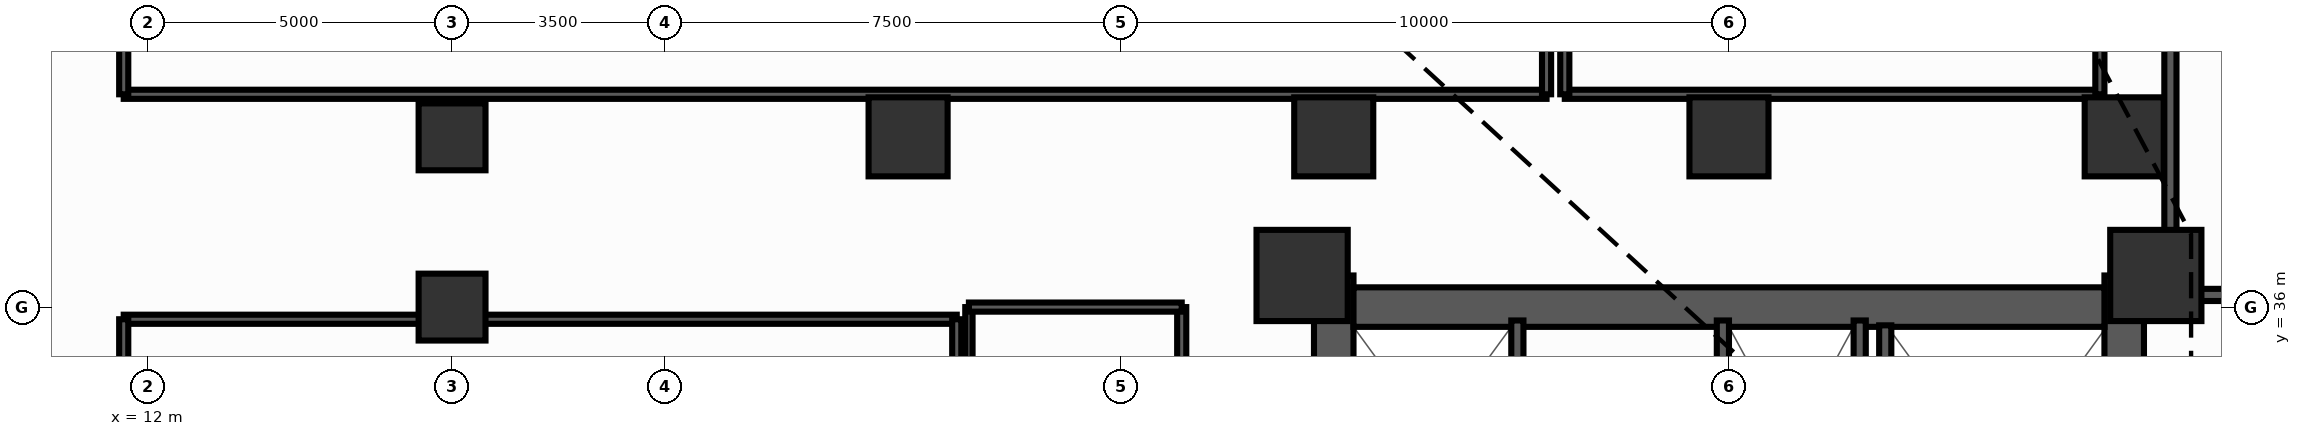
"""IFC4 building model, lengths in metres.
Left out: names, types, materials, properties, quantities, classifications, styles, units other than length and angle.
Written with IfcOpenShell. Run it as: python <this file> out.ifc"""

import sys

from ifc_helpers import new_model, si_unit, direction, frame, frame_2d, origin, origin_2d, place, context, subcontext, project, spatial, rectangle, extrude, source, transform, mapped, element, fill, save


model = new_model("IFC4")
c1 = context("Model", 3, precision=1e-05, world=origin(), true_north=direction((0.0, 1.0)))
c2 = subcontext(c1, "Body", "Model", "MODEL_VIEW")
j1 = project(units=[si_unit("LENGTHUNIT", "METRE"), si_unit("PLANEANGLEUNIT", "RADIAN")], contexts=[c1])
p1 = place(None, origin())
s1 = spatial("IfcSite", under=j1, at=p1, CompositionType="ELEMENT")
p2 = place(p1, origin())
s2 = spatial("IfcBuilding", under=s1, at=p2, CompositionType="ELEMENT")
p3 = place(p2, origin())
s3 = spatial("IfcBuildingStorey", under=s2, at=p3, CompositionType="ELEMENT", Elevation=0.0)
p4 = place(p3, frame((31.5, 17.48, 0.0), z_axis=(0.0, 0.0, 1.0), x_axis=(0.0, 1.0, 0.0)))
e1 = element("IfcWall", 1, at=p4, inside=s3, PredefinedType="SHEAR", context=c2, shape_type="SweptSolid", body=[
    extrude(rectangle(XDim=19.04, YDim=0.65, at=frame_2d((9.52, 0.0))), origin(), (0.0, 0.0, 1.0), 4.2),
])
p5 = place(p4, frame((6.32, 0.0, 0.0)))
e2 = element("IfcOpeningElement", 2, at=p5, cuts=e1, PredefinedType="OPENING", context=c2, shape_type="SweptSolid", body=[
    extrude(rectangle(XDim=1.1, YDim=2.15, at=frame_2d((0.55, 1.075))), frame((0.0, 0.337, 0.0), z_axis=(0.0, -1.0, 0.0), x_axis=(1.0, 0.0, 0.0)), (0.0, 0.0, 1.0), 0.674),
])
p6 = place(p3, frame((44.5, 17.48, 0.0), z_axis=(0.0, 0.0, 1.0), x_axis=(0.0, 1.0, 0.0)))
e3 = element("IfcWall", 3, at=p6, inside=s3, PredefinedType="SHEAR", context=c2, shape_type="SweptSolid", body=[
    extrude(rectangle(XDim=19.04, YDim=0.65, at=frame_2d((9.52, 0.0))), origin(), (0.0, 0.0, 1.0), 4.2),
])
p7 = place(p6, frame((12.67, 0.0, 0.0), z_axis=(0.0, 0.0, 1.0), x_axis=(-1.0, 0.0, 0.0)))
e4 = element("IfcOpeningElement", 4, at=p7, cuts=e3, PredefinedType="OPENING", context=c2, shape_type="SweptSolid", body=[
    extrude(rectangle(XDim=1.1, YDim=2.15, at=frame_2d((0.55, 1.075))), frame((0.0, 0.337, 0.0), z_axis=(0.0, -1.0, 0.0), x_axis=(1.0, 0.0, 0.0)), (0.0, 0.0, 1.0), 0.674),
])
p8 = place(p3, frame((31.825, 36.0, 0.0), z_axis=(0.0, 0.0, 1.0), x_axis=(1.0, 0.0, 0.0)))
e5 = element("IfcWall", 5, at=p8, inside=s3, PredefinedType="SHEAR", context=c2, shape_type="SweptSolid", body=[
    extrude(rectangle(XDim=12.35, YDim=0.65, at=frame_2d((6.175, 0.0))), origin(), (0.0, 0.0, 1.0), 4.2),
])
p9 = place(p8, frame((5.125, 0.0, 0.0), z_axis=(0.0, 0.0, 1.0), x_axis=(-1.0, 0.0, 0.0)))
e6 = element("IfcOpeningElement", 6, at=p9, cuts=e5, PredefinedType="OPENING", context=c2, shape_type="SweptSolid", body=[
    extrude(rectangle(XDim=1.4, YDim=2.15, at=frame_2d((0.7, 1.075))), frame((0.0, 0.337, 0.0), z_axis=(0.0, -1.0, 0.0), x_axis=(1.0, 0.0, 0.0)), (0.0, 0.0, 1.0), 0.674),
])
m1 = source(origin(), c2, "Body", "SweptSolid", [
    extrude(rectangle(XDim=1.5, YDim=1.5, at=origin_2d()), origin(), (0.0, 0.0, 1.0), 4.2),
])
for number, where, z_axis, x_axis in (
    (7, (30.98, 36.52, 0.0), (0.0, 0.0, 1.0), (1.0, 0.0, 0.0)),
    (8, (45.02, 36.52, 0.0), (0.0, 0.0, 1.0), (1.0, 0.0, 0.0)),
):
    element("IfcColumn", number, at=place(p3, frame(where, z_axis=z_axis, x_axis=x_axis)), inside=s3, PredefinedType="COLUMN", context=c2, shape_type="MappedRepresentation", body=[
        mapped(m1, transform((0.0, 0.0, 0.0), scale=1.0)),
    ])
m2 = source(origin(), c2, "Body", "SweptSolid", [
    extrude(rectangle(XDim=1.1, YDim=1.1, at=origin_2d()), origin(), (0.0, 0.0, 1.0), 4.2),
])
for number, where, z_axis, x_axis in (
    (9, (17.0, 36.0, 0.0), (0.0, 0.0, 1.0), (1.0, 0.0, 0.0)),
    (10, (17.0, 38.8, 0.0), (0.0, 0.0, 1.0), (1.0, 0.0, 0.0)),
):
    element("IfcColumn", number, at=place(p3, frame(where, z_axis=z_axis, x_axis=x_axis)), inside=s3, PredefinedType="COLUMN", context=c2, shape_type="MappedRepresentation", body=[
        mapped(m2, transform((0.0, 0.0, 0.0), scale=1.0)),
    ])
m3 = source(origin(), c2, "Body", "SweptSolid", [
    extrude(rectangle(XDim=1.3, YDim=1.3, at=origin_2d()), origin(), (0.0, 0.0, 1.0), 4.2),
])
for number, where, z_axis, x_axis in (
    (11, (24.5, 38.8, 0.0), (0.0, 0.0, 1.0), (1.0, 0.0, 0.0)),
    (12, (31.5, 38.8, 0.0), (0.0, 0.0, 1.0), (1.0, 0.0, 0.0)),
    (13, (38.0, 38.8, 0.0), (0.0, 0.0, 1.0), (1.0, 0.0, 0.0)),
    (14, (44.5, 38.8, 0.0), (0.0, 0.0, 1.0), (1.0, 0.0, 0.0)),
):
    element("IfcColumn", number, at=place(p3, frame(where, z_axis=z_axis, x_axis=x_axis)), inside=s3, PredefinedType="COLUMN", context=c2, shape_type="MappedRepresentation", body=[
        mapped(m3, transform((0.0, 0.0, 0.0), scale=1.0)),
    ])
p10 = place(p3, frame((40.15, 31.8, 0.0), z_axis=(0.0, 0.0, 1.0), x_axis=(0.0, 1.0, 0.0)))
e15 = element("IfcWall", 15, at=p10, inside=s3, PredefinedType="PARTITIONING", context=c2, shape_type="SweptSolid", body=[
    extrude(rectangle(XDim=3.98, YDim=0.2, at=frame_2d((1.99, 0.0))), origin(), (0.0, 0.0, 1.0), 3.92),
])
p11 = place(p3, frame((40.57, 28.65, 0.0), z_axis=(0.0, 0.0, 1.0), x_axis=(0.0, 1.0, 0.0)))
e16 = element("IfcWall", 16, at=p11, inside=s3, PredefinedType="SOLIDWALL", context=c2, shape_type="SweptSolid", body=[
    extrude(rectangle(XDim=7.05, YDim=0.2, at=frame_2d((3.525, 0.0))), origin(), (0.0, 0.0, 1.0), 3.92),
])
p12 = place(p3, frame((34.52, 25.44, 0.0), z_axis=(0.0, 0.0, 1.0), x_axis=(0.0, 1.0, 0.0)))
e17 = element("IfcWall", 17, at=p12, inside=s3, PredefinedType="PARTITIONING", context=c2, shape_type="SweptSolid", body=[
    extrude(rectangle(XDim=10.34, YDim=0.2, at=frame_2d((5.17, 0.0))), origin(), (0.0, 0.0, 1.0), 3.92),
])
p13 = place(p12, frame((0.32, 0.0, 0.0)))
e18 = element("IfcOpeningElement", 18, at=p13, cuts=e17, PredefinedType="OPENING", context=c2, shape_type="SweptSolid", body=[
    extrude(rectangle(XDim=1.0, YDim=2.15, at=frame_2d((0.5, 1.075))), frame((0.0, 0.112, 0.0), z_axis=(0.0, -1.0, 0.0), x_axis=(1.0, 0.0, 0.0)), (0.0, 0.0, 1.0), 0.224),
])
p14 = place(p12, frame((1.71, 0.0, 0.0)))
e19 = element("IfcOpeningElement", 19, at=p14, cuts=e17, PredefinedType="OPENING", context=c2, shape_type="SweptSolid", body=[
    extrude(rectangle(XDim=1.0, YDim=2.15, at=frame_2d((0.5, 1.075))), frame((0.0, 0.112, 0.0), z_axis=(0.0, -1.0, 0.0), x_axis=(1.0, 0.0, 0.0)), (0.0, 0.0, 1.0), 0.224),
])
p15 = place(p12, frame((3.535, 0.0, 0.0)))
e20 = element("IfcOpeningElement", 20, at=p15, cuts=e17, PredefinedType="OPENING", context=c2, shape_type="SweptSolid", body=[
    extrude(rectangle(XDim=1.0, YDim=2.15, at=frame_2d((0.5, 1.075))), frame((0.0, 0.112, 0.0), z_axis=(0.0, -1.0, 0.0), x_axis=(1.0, 0.0, 0.0)), (0.0, 0.0, 1.0), 0.224),
])
p16 = place(p12, frame((5.135, 0.0, 0.0)))
e21 = element("IfcOpeningElement", 21, at=p16, cuts=e17, PredefinedType="OPENING", context=c2, shape_type="SweptSolid", body=[
    extrude(rectangle(XDim=1.0, YDim=2.15, at=frame_2d((0.5, 1.075))), frame((0.0, 0.112, 0.0), z_axis=(0.0, -1.0, 0.0), x_axis=(1.0, 0.0, 0.0)), (0.0, 0.0, 1.0), 0.224),
])
p17 = place(p12, frame((7.01, 0.0, 0.0)))
e22 = element("IfcOpeningElement", 22, at=p17, cuts=e17, PredefinedType="OPENING", context=c2, shape_type="SweptSolid", body=[
    extrude(rectangle(XDim=1.0, YDim=2.15, at=frame_2d((0.5, 1.075))), frame((0.0, 0.112, 0.0), z_axis=(0.0, -1.0, 0.0), x_axis=(1.0, 0.0, 0.0)), (0.0, 0.0, 1.0), 0.224),
])
p18 = place(p12, frame((8.76, 0.0, 0.0)))
e23 = element("IfcOpeningElement", 23, at=p18, cuts=e17, PredefinedType="OPENING", context=c2, shape_type="SweptSolid", body=[
    extrude(rectangle(XDim=1.0, YDim=2.15, at=frame_2d((0.5, 1.075))), frame((0.0, 0.112, 0.0), z_axis=(0.0, -1.0, 0.0), x_axis=(1.0, 0.0, 0.0)), (0.0, 0.0, 1.0), 0.224),
])
p19 = place(p3, frame((37.9, 25.44, 0.0), z_axis=(0.0, 0.0, 1.0), x_axis=(0.0, 1.0, 0.0)))
e24 = element("IfcWall", 24, at=p19, inside=s3, PredefinedType="PARTITIONING", context=c2, shape_type="SweptSolid", body=[
    extrude(rectangle(XDim=10.34, YDim=0.2, at=frame_2d((5.17, 0.0))), origin(), (0.0, 0.0, 1.0), 3.92),
])
p20 = place(p19, frame((0.32, 0.0, 0.0)))
e25 = element("IfcOpeningElement", 25, at=p20, cuts=e24, PredefinedType="OPENING", context=c2, shape_type="SweptSolid", body=[
    extrude(rectangle(XDim=1.0, YDim=2.15, at=frame_2d((0.5, 1.075))), frame((0.0, 0.112, 0.0), z_axis=(0.0, -1.0, 0.0), x_axis=(1.0, 0.0, 0.0)), (0.0, 0.0, 1.0), 0.224),
])
p21 = place(p19, frame((1.71, 0.0, 0.0)))
e26 = element("IfcOpeningElement", 26, at=p21, cuts=e24, PredefinedType="OPENING", context=c2, shape_type="SweptSolid", body=[
    extrude(rectangle(XDim=1.0, YDim=2.15, at=frame_2d((0.5, 1.075))), frame((0.0, 0.112, 0.0), z_axis=(0.0, -1.0, 0.0), x_axis=(1.0, 0.0, 0.0)), (0.0, 0.0, 1.0), 0.224),
])
p22 = place(p19, frame((3.51, 0.0, 0.0)))
e27 = element("IfcOpeningElement", 27, at=p22, cuts=e24, PredefinedType="OPENING", context=c2, shape_type="SweptSolid", body=[
    extrude(rectangle(XDim=1.0, YDim=2.15, at=frame_2d((0.5, 1.075))), frame((0.0, 0.112, 0.0), z_axis=(0.0, -1.0, 0.0), x_axis=(1.0, 0.0, 0.0)), (0.0, 0.0, 1.0), 0.224),
])
p23 = place(p19, frame((5.01, 0.0, 0.0)))
e28 = element("IfcOpeningElement", 28, at=p23, cuts=e24, PredefinedType="OPENING", context=c2, shape_type="SweptSolid", body=[
    extrude(rectangle(XDim=1.0, YDim=2.15, at=frame_2d((0.5, 1.075))), frame((0.0, 0.112, 0.0), z_axis=(0.0, -1.0, 0.0), x_axis=(1.0, 0.0, 0.0)), (0.0, 0.0, 1.0), 0.224),
])
p24 = place(p19, frame((6.86, 0.0, 0.0)))
e29 = element("IfcOpeningElement", 29, at=p24, cuts=e24, PredefinedType="OPENING", context=c2, shape_type="SweptSolid", body=[
    extrude(rectangle(XDim=1.0, YDim=2.15, at=frame_2d((0.5, 1.075))), frame((0.0, 0.112, 0.0), z_axis=(0.0, -1.0, 0.0), x_axis=(1.0, 0.0, 0.0)), (0.0, 0.0, 1.0), 0.224),
])
p25 = place(p19, frame((8.71, 0.0, 0.0)))
e30 = element("IfcOpeningElement", 30, at=p25, cuts=e24, PredefinedType="OPENING", context=c2, shape_type="SweptSolid", body=[
    extrude(rectangle(XDim=1.0, YDim=2.15, at=frame_2d((0.5, 1.075))), frame((0.0, 0.112, 0.0), z_axis=(0.0, -1.0, 0.0), x_axis=(1.0, 0.0, 0.0)), (0.0, 0.0, 1.0), 0.224),
])
p26 = place(p3, frame((44.84, 36.2, 0.0), z_axis=(0.0, 0.0, 1.0), x_axis=(1.0, 0.0, 0.0)))
e31 = element("IfcWall", 31, at=p26, inside=s3, PredefinedType="PARTITIONING", context=c2, shape_type="SweptSolid", body=[
    extrude(rectangle(XDim=3.46, YDim=0.2, at=frame_2d((1.73, 0.0))), origin(), (0.0, 0.0, 1.0), 3.29),
])
p27 = place(p26, frame((1.36, 0.0, 0.0)))
e32 = element("IfcOpeningElement", 32, at=p27, cuts=e31, PredefinedType="OPENING", context=c2, shape_type="SweptSolid", body=[
    extrude(rectangle(XDim=1.1, YDim=2.15, at=frame_2d((0.55, 1.075))), frame((0.0, 0.112, 0.0), z_axis=(0.0, -1.0, 0.0), x_axis=(1.0, 0.0, 0.0)), (0.0, 0.0, 1.0), 0.224),
])
p28 = place(p3, frame((45.26, 36.2, 0.0), z_axis=(0.0, 0.0, 1.0), x_axis=(0.0, 1.0, 0.0)))
e33 = element("IfcWall", 33, at=p28, inside=s3, PredefinedType="PARTITIONING", context=c2, shape_type="SweptSolid", body=[
    extrude(rectangle(XDim=17.65, YDim=0.2, at=frame_2d((8.825, 0.0))), origin(), (0.0, 0.0, 1.0), 3.44),
])
p29 = place(p3, frame((25.5, 18.0, 0.0), z_axis=(0.0, 0.0, 1.0), x_axis=(0.0, 1.0, 0.0)))
e34 = element("IfcWall", 34, at=p29, inside=s3, PredefinedType="PARTITIONING", context=c2, shape_type="SweptSolid", body=[
    extrude(rectangle(XDim=18.0, YDim=0.12, at=frame_2d((9.0, 0.0))), origin(), (0.0, 0.0, 1.0), 3.92),
])
p30 = place(p3, frame((29.0, 29.7, 0.0), z_axis=(0.0, 0.0, 1.0), x_axis=(0.0, 1.0, 0.0)))
e35 = element("IfcWall", 35, at=p30, inside=s3, PredefinedType="PARTITIONING", context=c2, shape_type="SweptSolid", body=[
    extrude(rectangle(XDim=6.3, YDim=0.15, at=frame_2d((3.15, 0.0))), origin(), (0.0, 0.0, 1.0), 3.92),
])
p31 = place(p30, frame((2.75, 0.0, 0.0)))
e36 = element("IfcOpeningElement", 36, at=p31, cuts=e35, PredefinedType="OPENING", context=c2, shape_type="SweptSolid", body=[
    extrude(rectangle(XDim=0.8, YDim=2.05, at=frame_2d((0.4, 1.025))), frame((0.0, 0.087, 0.0), z_axis=(0.0, -1.0, 0.0), x_axis=(1.0, 0.0, 0.0)), (0.0, 0.0, 1.0), 0.174),
])
p32 = place(p3, frame((25.5, 36.0, 0.0), z_axis=(0.0, 0.0, 1.0), x_axis=(1.0, 0.0, 0.0)))
e37 = element("IfcWall", 37, at=p32, inside=s3, PredefinedType="PARTITIONING", context=c2, shape_type="SweptSolid", body=[
    extrude(rectangle(XDim=3.5, YDim=0.15, at=frame_2d((1.75, 0.0))), origin(), (0.0, 0.0, 1.0), 3.29),
])
p33 = place(p3, frame((11.6, 39.5, 0.0), z_axis=(0.0, 0.0, 1.0), x_axis=(1.0, 0.0, 0.0)))
e38 = element("IfcWall", 38, at=p33, inside=s3, PredefinedType="PARTITIONING", context=c2, shape_type="SweptSolid", body=[
    extrude(rectangle(XDim=23.4, YDim=0.15, at=frame_2d((11.7, 0.0))), origin(), (0.0, 0.0, 1.0), 3.92),
])
p34 = place(p33, frame((9.844, 0.0, 0.0)))
e39 = element("IfcOpeningElement", 39, at=p34, cuts=e38, PredefinedType="OPENING", context=c2, shape_type="SweptSolid", body=[
    extrude(rectangle(XDim=1.0, YDim=2.15, at=frame_2d((0.5, 1.075))), frame((0.0, 0.087, 0.0), z_axis=(0.0, -1.0, 0.0), x_axis=(1.0, 0.0, 0.0)), (0.0, 0.0, 1.0), 0.174),
])
for number, where, z_axis, x_axis in (
    (40, (11.6, 39.5, 0.0), (0.0, 0.0, 1.0), (0.0, 1.0, 0.0)),
    (41, (35.0, 39.5, 0.0), (0.0, 0.0, 1.0), (0.0, 1.0, 0.0)),
):
    element("IfcWall", number, at=place(p3, frame(where, z_axis=z_axis, x_axis=x_axis)), inside=s3, PredefinedType="PARTITIONING", context=c2, shape_type="SweptSolid", body=[
        extrude(rectangle(XDim=14.4, YDim=0.15, at=frame_2d((7.2, 0.0))), origin(), (0.0, 0.0, 1.0), 3.92),
    ])
p35 = place(p3, frame((35.3, 39.5, 0.0), z_axis=(0.0, 0.0, 1.0), x_axis=(1.0, 0.0, 0.0)))
e42 = element("IfcWall", 42, at=p35, inside=s3, PredefinedType="PARTITIONING", context=c2, shape_type="SweptSolid", body=[
    extrude(rectangle(XDim=8.8, YDim=0.15, at=frame_2d((4.4, 0.0))), origin(), (0.0, 0.0, 1.0), 3.92),
])
p36 = place(p35, frame((4.566, 0.0, 0.0)))
e43 = element("IfcOpeningElement", 43, at=p36, cuts=e42, PredefinedType="OPENING", context=c2, shape_type="SweptSolid", body=[
    extrude(rectangle(XDim=1.0, YDim=2.1, at=frame_2d((0.5, 1.05))), frame((0.0, 0.087, 0.0), z_axis=(0.0, -1.0, 0.0), x_axis=(1.0, 0.0, 0.0)), (0.0, 0.0, 1.0), 0.174),
])
for number, where, z_axis, x_axis in (
    (44, (35.3, 39.5, 0.0), (0.0, 0.0, 1.0), (0.0, 1.0, 0.0)),
    (45, (44.1, 39.5, 0.0), (0.0, 0.0, 1.0), (0.0, 1.0, 0.0)),
):
    element("IfcWall", number, at=place(p3, frame(where, z_axis=z_axis, x_axis=x_axis)), inside=s3, PredefinedType="PARTITIONING", context=c2, shape_type="SweptSolid", body=[
        extrude(rectangle(XDim=14.4, YDim=0.15, at=frame_2d((7.2, 0.0))), origin(), (0.0, 0.0, 1.0), 3.92),
    ])
p37 = place(p3, frame((11.6, 35.8, 0.0), z_axis=(0.0, 0.0, 1.0), x_axis=(1.0, 0.0, 0.0)))
e46 = element("IfcWall", 46, at=p37, inside=s3, PredefinedType="PARTITIONING", context=c2, shape_type="SweptSolid", body=[
    extrude(rectangle(XDim=13.7, YDim=0.15, at=frame_2d((6.85, 0.0))), origin(), (0.0, 0.0, 1.0), 3.92),
])
p38 = place(p3, frame((11.6, 27.1, 0.0), z_axis=(0.0, 0.0, 1.0), x_axis=(0.0, 1.0, 0.0)))
e47 = element("IfcWall", 47, at=p38, inside=s3, PredefinedType="PARTITIONING", context=c2, shape_type="SweptSolid", body=[
    extrude(rectangle(XDim=8.7, YDim=0.15, at=frame_2d((4.35, 0.0))), origin(), (0.0, 0.0, 1.0), 3.92),
])
p39 = place(p38, frame((3.631, 0.0, 0.0)))
e48 = element("IfcOpeningElement", 48, at=p39, cuts=e47, PredefinedType="OPENING", context=c2, shape_type="SweptSolid", body=[
    extrude(rectangle(XDim=1.0, YDim=2.1, at=frame_2d((0.5, 1.05))), frame((0.0, 0.087, 0.0), z_axis=(0.0, -1.0, 0.0), x_axis=(1.0, 0.0, 0.0)), (0.0, 0.0, 1.0), 0.174),
])
p40 = place(p3, frame((25.3, 27.1, 0.0), z_axis=(0.0, 0.0, 1.0), x_axis=(0.0, 1.0, 0.0)))
e49 = element("IfcWall", 49, at=p40, inside=s3, PredefinedType="PARTITIONING", context=c2, shape_type="SweptSolid", body=[
    extrude(rectangle(XDim=8.7, YDim=0.15, at=frame_2d((4.35, 0.0))), origin(), (0.0, 0.0, 1.0), 3.92),
])
m4 = source(origin(), c2, "Body", "SweptSolid", [
    extrude(rectangle(XDim=1.4, YDim=2.15, at=frame_2d((0.7, 1.075))), frame((0.0, 0.025, 0.0), z_axis=(0.0, -1.0, 0.0), x_axis=(1.0, 0.0, 0.0)), (0.0, 0.0, 1.0), 0.05),
])
p41 = place(p9, origin())
e50 = element("IfcDoor", 50, at=p41, inside=s3, OperationType="SINGLE_SWING_RIGHT", PredefinedType="DOOR", context=c2, shape_type="MappedRepresentation", body=[
    mapped(m4, transform((0.0, 0.0, 0.0), scale=1.0)),
])
fill(e6, e50)
m5 = source(origin(), c2, "Body", "SweptSolid", [
    extrude(rectangle(XDim=1.0, YDim=2.15, at=frame_2d((0.5, 1.075))), frame((0.0, 0.025, 0.0), z_axis=(0.0, -1.0, 0.0), x_axis=(1.0, 0.0, 0.0)), (0.0, 0.0, 1.0), 0.05),
])
p42 = place(p34, origin())
e51 = element("IfcDoor", 51, at=p42, inside=s3, OperationType="SINGLE_SWING_RIGHT", PredefinedType="DOOR", context=c2, shape_type="MappedRepresentation", body=[
    mapped(m5, transform((0.0, 0.0, 0.0), scale=1.0)),
])
fill(e39, e51)
m6 = source(origin(), c2, "Body", "SweptSolid", [
    extrude(rectangle(XDim=1.0, YDim=2.1, at=frame_2d((0.5, 1.05))), frame((0.0, 0.025, 0.0), z_axis=(0.0, -1.0, 0.0), x_axis=(1.0, 0.0, 0.0)), (0.0, 0.0, 1.0), 0.05),
])
p43 = place(p36, origin())
e52 = element("IfcDoor", 52, at=p43, inside=s3, OperationType="SINGLE_SWING_LEFT", PredefinedType="DOOR", context=c2, shape_type="MappedRepresentation", body=[
    mapped(m6, transform((0.0, 0.0, 0.0), scale=1.0)),
])
fill(e43, e52)
save(model, sys.argv[1])
